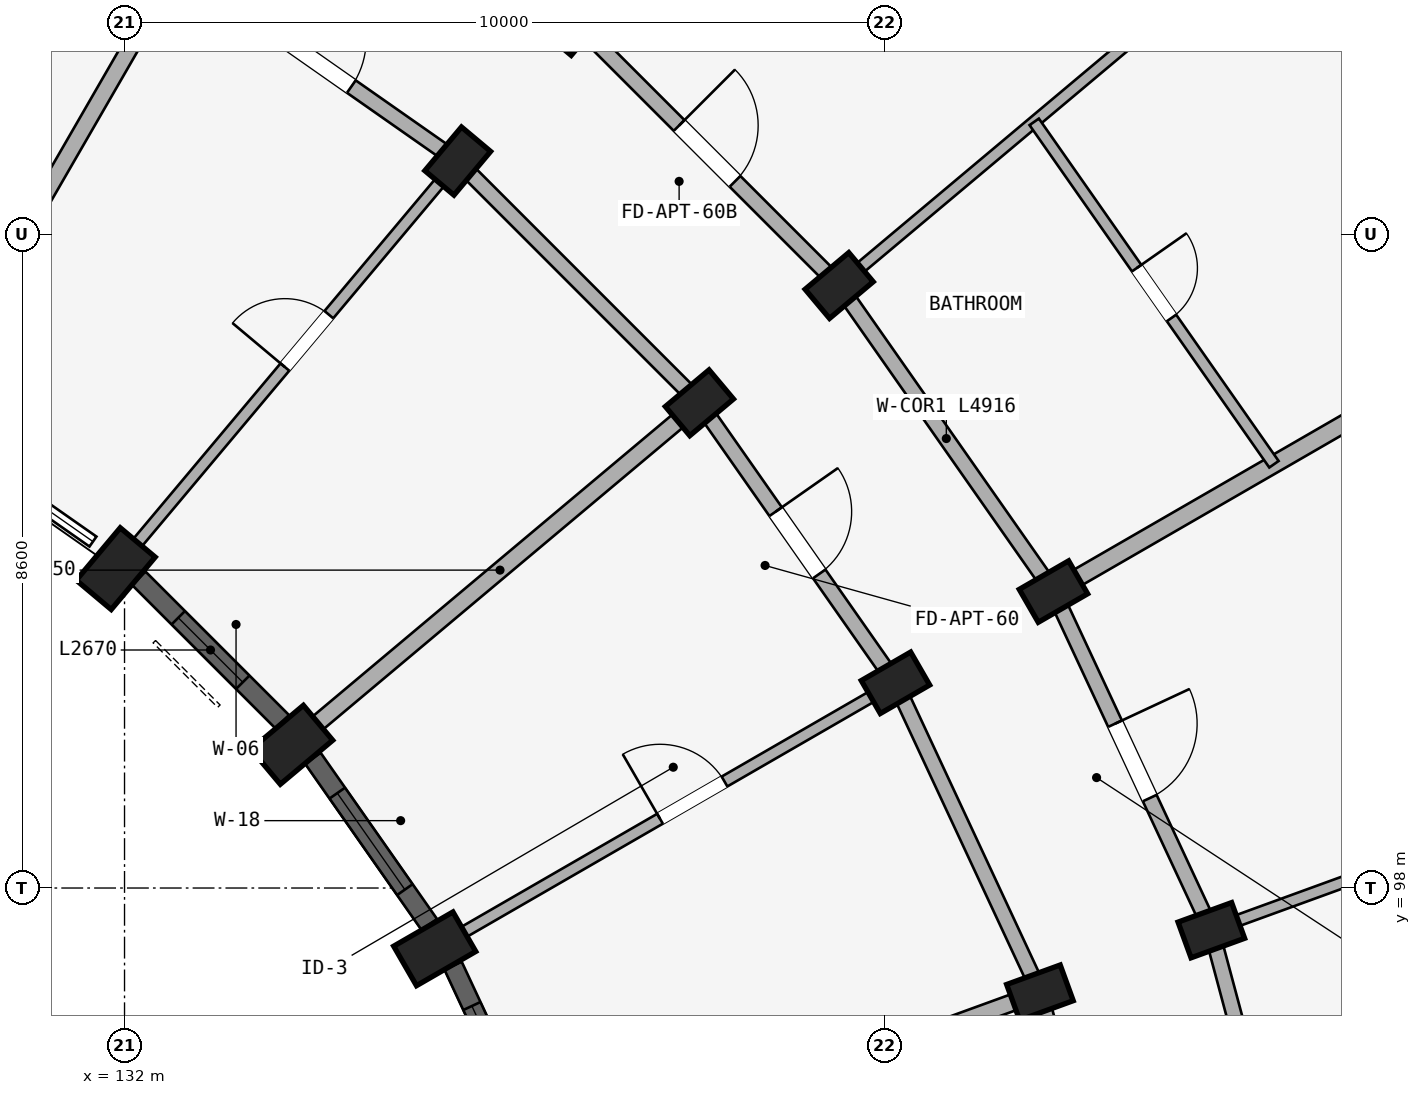
"""IFC4 building model, lengths in metres.
Left out: names, types, materials, properties, quantities, classifications, styles, units other than length and angle.
Written with IfcOpenShell. Run it as: python <this file> out.ifc"""

import sys

from ifc_helpers import new_model, si_unit, direction, frame, frame_2d, origin, origin_2d, place, context, subcontext, project, spatial, rectangle, extrude, element, fill, save


model = new_model("IFC4")
c1 = context("Model", 3, precision=1e-05, world=origin(), true_north=direction((0.0, 1.0)))
c2 = subcontext(c1, "Body", "Model", "MODEL_VIEW")
j1 = project(units=[si_unit("LENGTHUNIT", "METRE"), si_unit("PLANEANGLEUNIT", "RADIAN")], contexts=[c1])
p1 = place(None, origin())
s1 = spatial("IfcSite", under=j1, at=p1, CompositionType="ELEMENT")
p2 = place(p1, origin())
s2 = spatial("IfcBuilding", under=s1, at=p2, CompositionType="ELEMENT")
p3 = place(p2, frame((0.0, 0.0, 4.5)))
s3 = spatial("IfcBuildingStorey", under=s2, at=p3, CompositionType="ELEMENT", Elevation=4.5)
p4 = place(p3, frame((131.885, 102.202, 0.0), z_axis=(0.0, 0.0, 1.0), x_axis=(-0.766044443119, 0.642787609687, 0.0)))
e1 = element("IfcColumn", 1, at=p4, inside=s3, PredefinedType="COLUMN", context=c2, shape_type="SweptSolid", body=[
    extrude(rectangle(XDim=0.6, YDim=0.9, at=origin_2d()), origin(), (0.0, 0.0, 1.0), 3.98),
])
for number, where, z_axis, x_axis in (
    (2, (136.384, 107.564, 0.0), (0.0, 0.0, 1.0), (-0.766, 0.643, 0.0)),
    (3, (137.927, 109.402, 0.0), (0.0, 0.0, 1.0), (-0.766, 0.643, 0.0)),
):
    element("IfcColumn", number, at=place(p3, frame(where, z_axis=z_axis, x_axis=x_axis)), inside=s3, PredefinedType="COLUMN", context=c2, shape_type="SweptSolid", body=[
        extrude(rectangle(XDim=0.5, YDim=0.75, at=origin_2d()), origin(), (0.0, 0.0, 1.0), 3.98),
    ])
p5 = place(p3, frame((134.202, 99.885, 0.0), z_axis=(0.0, 0.0, 1.0), x_axis=(-0.642787609687, 0.766044443119, 0.0)))
e4 = element("IfcColumn", 4, at=p5, inside=s3, PredefinedType="COLUMN", context=c2, shape_type="SweptSolid", body=[
    extrude(rectangle(XDim=0.6, YDim=0.9, at=origin_2d()), origin(), (0.0, 0.0, 1.0), 3.98),
])
for number, where, z_axis, x_axis in (
    (5, (139.564, 104.384, 0.0), (0.0, 0.0, 1.0), (-0.643, 0.766, 0.0)),
    (6, (141.402, 105.927, 0.0), (0.0, 0.0, 1.0), (-0.643, 0.766, 0.0)),
):
    element("IfcColumn", number, at=place(p3, frame(where, z_axis=z_axis, x_axis=x_axis)), inside=s3, PredefinedType="COLUMN", context=c2, shape_type="SweptSolid", body=[
        extrude(rectangle(XDim=0.5, YDim=0.75, at=origin_2d()), origin(), (0.0, 0.0, 1.0), 3.98),
    ])
p6 = place(p3, frame((136.081, 97.2, 0.0), z_axis=(0.0, 0.0, 1.0), x_axis=(-0.5, 0.866025403784, 0.0)))
e7 = element("IfcColumn", 7, at=p6, inside=s3, PredefinedType="COLUMN", context=c2, shape_type="SweptSolid", body=[
    extrude(rectangle(XDim=0.6, YDim=0.9, at=origin_2d()), origin(), (0.0, 0.0, 1.0), 3.98),
])
for number, where, z_axis, x_axis in (
    (8, (142.144, 100.7, 0.0), (0.0, 0.0, 1.0), (-0.5, 0.866, 0.0)),
    (9, (144.222, 101.9, 0.0), (0.0, 0.0, 1.0), (-0.5, 0.866, 0.0)),
    (10, (144.044, 96.624, 0.0), (0.0, 0.0, 1.0), (-0.342, 0.94, 0.0)),
    (11, (146.299, 97.445, 0.0), (0.0, 0.0, 1.0), (-0.342, 0.94, 0.0)),
):
    element("IfcColumn", number, at=place(p3, frame(where, z_axis=z_axis, x_axis=x_axis)), inside=s3, PredefinedType="COLUMN", context=c2, shape_type="SweptSolid", body=[
        extrude(rectangle(XDim=0.5, YDim=0.75, at=origin_2d()), origin(), (0.0, 0.0, 1.0), 3.98),
    ])
p7 = place(p3, frame((132.7, 110.144, 0.0), z_axis=(0.0, 0.0, 1.0), x_axis=(0.819155404658, -0.573571637217, 0.0)))
e12 = element("IfcWall", 12, at=p7, inside=s3, PredefinedType="STANDARD", context=c2, shape_type="SweptSolid", body=[
    extrude(rectangle(XDim=4.497, YDim=0.2, at=frame_2d((2.249, 0.0))), origin(), (0.0, 0.0, 1.0), 3.322),
])
p8 = place(p7, frame((1.709, 0.0, 0.0)))
e13 = element("IfcOpeningElement", 13, at=p8, cuts=e12, PredefinedType="OPENING", context=c2, shape_type="SweptSolid", body=[
    extrude(rectangle(XDim=1.08, YDim=2.15, at=frame_2d((0.54, 1.075))), frame((0.0, 0.11, 0.0), z_axis=(0.0, -1.0, 0.0), x_axis=(1.0, 0.0, 0.0)), (0.0, 0.0, 1.0), 0.22),
])
p9 = place(p3, frame((136.384, 107.564, 0.0), z_axis=(0.0, 0.0, 1.0), x_axis=(0.707106781187, -0.707106781187, 0.0)))
e14 = element("IfcWall", 14, at=p9, inside=s3, PredefinedType="STANDARD", context=c2, shape_type="SweptSolid", body=[
    extrude(rectangle(XDim=4.497, YDim=0.2, at=frame_2d((2.249, 0.0))), origin(), (0.0, 0.0, 1.0), 3.322),
])
p10 = place(p3, frame((137.927, 109.402, 0.0), z_axis=(0.0, 0.0, 1.0), x_axis=(0.707106781187, -0.707106781187, 0.0)))
e15 = element("IfcWall", 15, at=p10, inside=s3, PredefinedType="STANDARD", context=c2, shape_type="SweptSolid", body=[
    extrude(rectangle(XDim=4.916, YDim=0.2, at=frame_2d((2.458, 0.0))), origin(), (0.0, 0.0, 1.0), 3.322),
])
p11 = place(p10, frame((1.938, 0.0, 0.0)))
e16 = element("IfcOpeningElement", 16, at=p11, cuts=e15, PredefinedType="OPENING", context=c2, shape_type="SweptSolid", body=[
    extrude(rectangle(XDim=1.04, YDim=2.15, at=frame_2d((0.52, 1.075))), frame((0.0, 0.11, 0.0), z_axis=(0.0, -1.0, 0.0), x_axis=(1.0, 0.0, 0.0)), (0.0, 0.0, 1.0), 0.22),
])
p12 = place(p3, frame((139.564, 104.384, 0.0), z_axis=(0.0, 0.0, 1.0), x_axis=(0.573571637217, -0.819155404658, 0.0)))
e17 = element("IfcWall", 17, at=p12, inside=s3, PredefinedType="STANDARD", context=c2, shape_type="SweptSolid", body=[
    extrude(rectangle(XDim=4.497, YDim=0.2, at=frame_2d((2.249, 0.0))), origin(), (0.0, 0.0, 1.0), 3.322),
])
p13 = place(p12, frame((1.749, 0.0, 0.0)))
e18 = element("IfcOpeningElement", 18, at=p13, cuts=e17, PredefinedType="OPENING", context=c2, shape_type="SweptSolid", body=[
    extrude(rectangle(XDim=1.0, YDim=2.15, at=frame_2d((0.5, 1.075))), frame((0.0, 0.11, 0.0), z_axis=(0.0, -1.0, 0.0), x_axis=(1.0, 0.0, 0.0)), (0.0, 0.0, 1.0), 0.22),
])
p14 = place(p3, frame((141.402, 105.927, 0.0), z_axis=(0.0, 0.0, 1.0), x_axis=(0.573592335331, -0.819140911474, 0.0)))
e19 = element("IfcWall", 19, at=p14, inside=s3, PredefinedType="STANDARD", context=c2, shape_type="SweptSolid", body=[
    extrude(rectangle(XDim=4.916, YDim=0.2, at=frame_2d((2.458, 0.0))), origin(), (0.0, 0.0, 1.0), 3.322),
])
p15 = place(p3, frame((142.144, 100.7, 0.0), z_axis=(0.0, 0.0, 1.0), x_axis=(0.422617978463, -0.906307919131, 0.0)))
e20 = element("IfcWall", 20, at=p15, inside=s3, PredefinedType="STANDARD", context=c2, shape_type="SweptSolid", body=[
    extrude(rectangle(XDim=4.497, YDim=0.2, at=frame_2d((2.249, 0.0))), origin(), (0.0, 0.0, 1.0), 3.322),
])
p16 = place(p3, frame((144.222, 101.9, 0.0), z_axis=(0.0, 0.0, 1.0), x_axis=(0.422629854778, -0.906302381024, 0.0)))
e21 = element("IfcWall", 21, at=p16, inside=s3, PredefinedType="STANDARD", context=c2, shape_type="SweptSolid", body=[
    extrude(rectangle(XDim=4.915, YDim=0.2, at=frame_2d((2.458, 0.0))), origin(), (0.0, 0.0, 1.0), 3.322),
])
p17 = place(p16, frame((1.918, 0.0, 0.0)))
e22 = element("IfcOpeningElement", 22, at=p17, cuts=e21, PredefinedType="OPENING", context=c2, shape_type="SweptSolid", body=[
    extrude(rectangle(XDim=1.08, YDim=2.15, at=frame_2d((0.54, 1.075))), frame((0.0, 0.11, 0.0), z_axis=(0.0, -1.0, 0.0), x_axis=(1.0, 0.0, 0.0)), (0.0, 0.0, 1.0), 0.22),
])
p18 = place(p3, frame((144.044, 96.624, 0.0), z_axis=(0.0, 0.0, 1.0), x_axis=(0.258787642463, -0.965934240054, 0.0)))
e23 = element("IfcWall", 23, at=p18, inside=s3, PredefinedType="STANDARD", context=c2, shape_type="SweptSolid", body=[
    extrude(rectangle(XDim=4.497, YDim=0.2, at=frame_2d((2.249, 0.0))), origin(), (0.0, 0.0, 1.0), 3.322),
])
p19 = place(p18, frame((1.729, 0.0, 0.0)))
e24 = element("IfcOpeningElement", 24, at=p19, cuts=e23, PredefinedType="OPENING", context=c2, shape_type="SweptSolid", body=[
    extrude(rectangle(XDim=1.04, YDim=2.15, at=frame_2d((0.52, 1.075))), frame((0.0, 0.11, 0.0), z_axis=(0.0, -1.0, 0.0), x_axis=(1.0, 0.0, 0.0)), (0.0, 0.0, 1.0), 0.22),
])
p20 = place(p3, frame((146.299, 97.445, 0.0), z_axis=(0.0, 0.0, 1.0), x_axis=(0.258803112091, -0.965930095386, 0.0)))
e25 = element("IfcWall", 25, at=p20, inside=s3, PredefinedType="STANDARD", context=c2, shape_type="SweptSolid", body=[
    extrude(rectangle(XDim=4.916, YDim=0.2, at=frame_2d((2.458, 0.0))), origin(), (0.0, 0.0, 1.0), 3.322),
])
p21 = place(p3, frame((129.3, 104.254, 0.0), z_axis=(0.0, 0.0, 1.0), x_axis=(0.499997969693, 0.866026575979, 0.0)))
e26 = element("IfcWall", 26, at=p21, inside=s3, PredefinedType="STANDARD", context=c2, shape_type="SweptSolid", body=[
    extrude(rectangle(XDim=6.75, YDim=0.22, at=frame_2d((3.375, 0.0))), origin(), (0.0, 0.0, 1.0), 3.322),
])
p22 = place(p3, frame((132.013, 102.355, 0.0), z_axis=(0.0, 0.0, 1.0), x_axis=(0.642784846501, 0.766046761698, 0.0)))
e27 = element("IfcWall", 27, at=p22, inside=s3, PredefinedType="PARTITIONING", context=c2, shape_type="SweptSolid", body=[
    extrude(rectangle(XDim=6.75, YDim=0.15, at=frame_2d((3.375, 0.0))), origin(), (0.0, 0.0, 1.0), 3.322),
])
p23 = place(p22, frame((3.262, 0.0, 0.0)))
e28 = element("IfcOpeningElement", 28, at=p23, cuts=e27, PredefinedType="OPENING", context=c2, shape_type="SweptSolid", body=[
    extrude(rectangle(XDim=0.9, YDim=2.1, at=frame_2d((0.45, 1.05))), frame((0.0, 0.085, 0.0), z_axis=(0.0, -1.0, 0.0), x_axis=(1.0, 0.0, 0.0)), (0.0, 0.0, 1.0), 0.17),
])
p24 = place(p3, frame((134.355, 100.013, 0.0), z_axis=(0.0, 0.0, 1.0), x_axis=(0.766046761698, 0.642784846501, 0.0)))
e29 = element("IfcWall", 29, at=p24, inside=s3, PredefinedType="STANDARD", context=c2, shape_type="SweptSolid", body=[
    extrude(rectangle(XDim=6.75, YDim=0.22, at=frame_2d((3.375, 0.0))), origin(), (0.0, 0.0, 1.0), 3.322),
])
p25 = place(p3, frame((141.479, 105.991, 0.0), z_axis=(0.0, 0.0, 1.0), x_axis=(0.766046835987, 0.642784757967, 0.0)))
e30 = element("IfcWall", 30, at=p25, inside=s3, PredefinedType="PARTITIONING", context=c2, shape_type="SweptSolid", body=[
    extrude(rectangle(XDim=17.42, YDim=0.15, at=frame_2d((8.71, 0.0))), origin(), (0.0, 0.0, 1.0), 3.322),
])
p26 = place(p25, frame((7.5, 0.0, 0.0)))
e31 = element("IfcOpeningElement", 31, at=p26, cuts=e30, PredefinedType="OPENING", context=c2, shape_type="SweptSolid", body=[
    extrude(rectangle(XDim=0.8, YDim=2.1, at=frame_2d((0.4, 1.05))), frame((0.0, 0.085, 0.0), z_axis=(0.0, -1.0, 0.0), x_axis=(1.0, 0.0, 0.0)), (0.0, 0.0, 1.0), 0.17),
])
p27 = place(p3, frame((136.254, 97.3, 0.0), z_axis=(0.0, 0.0, 1.0), x_axis=(0.866026575979, 0.499997969693, 0.0)))
e32 = element("IfcWall", 32, at=p27, inside=s3, PredefinedType="PARTITIONING", context=c2, shape_type="SweptSolid", body=[
    extrude(rectangle(XDim=6.75, YDim=0.15, at=frame_2d((3.375, 0.0))), origin(), (0.0, 0.0, 1.0), 3.322),
])
p28 = place(p27, frame((3.222, 0.0, 0.0)))
e33 = element("IfcOpeningElement", 33, at=p28, cuts=e32, PredefinedType="OPENING", context=c2, shape_type="SweptSolid", body=[
    extrude(rectangle(XDim=0.98, YDim=2.12, at=frame_2d((0.49, 1.06))), frame((0.0, 0.085, 0.0), z_axis=(0.0, -1.0, 0.0), x_axis=(1.0, 0.0, 0.0)), (0.0, 0.0, 1.0), 0.17),
])
p29 = place(p3, frame((144.309, 101.95, 0.0), z_axis=(0.0, 0.0, 1.0), x_axis=(0.866026648973, 0.499997843263, 0.0)))
e34 = element("IfcWall", 34, at=p29, inside=s3, PredefinedType="STANDARD", context=c2, shape_type="SweptSolid", body=[
    extrude(rectangle(XDim=17.42, YDim=0.23, at=frame_2d((8.71, 0.0))), origin(), (0.0, 0.0, 1.0), 3.322),
])
p30 = place(p3, frame((137.654, 94.298, 0.0), z_axis=(0.0, 0.0, 1.0), x_axis=(0.939696231917, 0.342010221662, 0.0)))
e35 = element("IfcWall", 35, at=p30, inside=s3, PredefinedType="STANDARD", context=c2, shape_type="SweptSolid", body=[
    extrude(rectangle(XDim=6.75, YDim=0.22, at=frame_2d((3.375, 0.0))), origin(), (0.0, 0.0, 1.0), 3.322),
])
p31 = place(p3, frame((146.393, 97.479, 0.0), z_axis=(0.0, 0.0, 1.0), x_axis=(0.939691901159, 0.342022120477, 0.0)))
e36 = element("IfcWall", 36, at=p31, inside=s3, PredefinedType="PARTITIONING", context=c2, shape_type="SweptSolid", body=[
    extrude(rectangle(XDim=17.42, YDim=0.15, at=frame_2d((8.71, 0.0))), origin(), (0.0, 0.0, 1.0), 3.322),
])
p32 = place(p31, frame((7.5, 0.0, 0.0)))
e37 = element("IfcOpeningElement", 37, at=p32, cuts=e36, PredefinedType="OPENING", context=c2, shape_type="SweptSolid", body=[
    extrude(rectangle(XDim=0.8, YDim=2.1, at=frame_2d((0.4, 1.05))), frame((0.0, 0.085, 0.0), z_axis=(0.0, -1.0, 0.0), x_axis=(1.0, 0.0, 0.0)), (0.0, 0.0, 1.0), 0.17),
])
p33 = place(p3, frame((143.969, 108.08, 0.0), z_axis=(0.0, 0.0, 1.0), x_axis=(0.573569599955, -0.819156831143, 0.0)))
e38 = element("IfcWall", 38, at=p33, inside=s3, PredefinedType="PLUMBINGWALL", context=c2, shape_type="SweptSolid", body=[
    extrude(rectangle(XDim=5.5, YDim=0.15, at=frame_2d((2.75, 0.0))), origin(), (0.0, 0.0, 1.0), 3.322),
])
p34 = place(p33, frame((2.35, 0.0, 0.0)))
e39 = element("IfcOpeningElement", 39, at=p34, cuts=e38, PredefinedType="OPENING", context=c2, shape_type="SweptSolid", body=[
    extrude(rectangle(XDim=0.8, YDim=2.1, at=frame_2d((0.4, 1.05))), frame((0.0, 0.085, 0.0), z_axis=(0.0, -1.0, 0.0), x_axis=(1.0, 0.0, 0.0)), (0.0, 0.0, 1.0), 0.17),
])
p35 = place(p3, frame((132.188, 102.075, 0.0), z_axis=(0.0, 0.0, 1.0), x_axis=(0.707106781187, -0.707106781187, 0.0)))
e40 = element("IfcWall", 40, at=p35, inside=s3, PredefinedType="STANDARD", context=c2, shape_type="SweptSolid", body=[
    extrude(rectangle(XDim=2.67, YDim=0.25, at=frame_2d((1.335, 0.0))), origin(), (0.0, 0.0, 1.0), 3.472),
])
p36 = place(p35, frame((0.735, 0.0, 0.88)))
e41 = element("IfcOpeningElement", 41, at=p36, cuts=e40, PredefinedType="OPENING", context=c2, shape_type="SweptSolid", body=[
    extrude(rectangle(XDim=1.2, YDim=1.5, at=frame_2d((0.6, 0.75))), frame((0.0, 0.135, 0.0), z_axis=(0.0, -1.0, 0.0), x_axis=(1.0, 0.0, 0.0)), (0.0, 0.0, 1.0), 0.27),
])
p37 = place(p3, frame((134.478, 99.707, 0.0), z_axis=(0.0, 0.0, 1.0), x_axis=(0.573591230309, -0.819141685249, 0.0)))
e42 = element("IfcWall", 42, at=p37, inside=s3, PredefinedType="STANDARD", context=c2, shape_type="SweptSolid", body=[
    extrude(rectangle(XDim=2.67, YDim=0.25, at=frame_2d((1.335, 0.0))), origin(), (0.0, 0.0, 1.0), 3.472),
])
p38 = place(p37, frame((0.56, 0.0, 0.88)))
e43 = element("IfcOpeningElement", 43, at=p38, cuts=e42, PredefinedType="OPENING", context=c2, shape_type="SweptSolid", body=[
    extrude(rectangle(XDim=1.55, YDim=1.6, at=frame_2d((0.775, 0.8))), frame((0.0, 0.135, 0.0), z_axis=(0.0, -1.0, 0.0), x_axis=(1.0, 0.0, 0.0)), (0.0, 0.0, 1.0), 0.27),
])
p39 = place(p3, frame((136.323, 96.978, 0.0), z_axis=(0.0, 0.0, 1.0), x_axis=(0.422610081738, -0.90631160139, 0.0)))
e44 = element("IfcWall", 44, at=p39, inside=s3, PredefinedType="STANDARD", context=c2, shape_type="SweptSolid", body=[
    extrude(rectangle(XDim=2.669, YDim=0.25, at=frame_2d((1.335, 0.0))), origin(), (0.0, 0.0, 1.0), 3.472),
])
p40 = place(p39, frame((0.585, 0.0, 0.88)))
e45 = element("IfcOpeningElement", 45, at=p40, cuts=e44, PredefinedType="OPENING", context=c2, shape_type="SweptSolid", body=[
    extrude(rectangle(XDim=1.5, YDim=1.65, at=frame_2d((0.75, 0.825))), frame((0.0, 0.135, 0.0), z_axis=(0.0, -1.0, 0.0), x_axis=(1.0, 0.0, 0.0)), (0.0, 0.0, 1.0), 0.27),
])
p41 = place(p36, origin())
e46 = element("IfcWindow", 46, at=p41, inside=s3, PartitioningType="SINGLE_PANEL", PredefinedType="WINDOW", context=c2, shape_type="SweptSolid", body=[
    extrude(rectangle(XDim=1.2, YDim=1.5, at=frame_2d((0.6, 0.75))), frame((0.0, 0.03, 0.0), z_axis=(0.0, -1.0, 0.0), x_axis=(1.0, 0.0, 0.0)), (0.0, 0.0, 1.0), 0.06),
])
fill(e41, e46)
p42 = place(p38, origin())
e47 = element("IfcWindow", 47, at=p42, inside=s3, PartitioningType="DOUBLE_PANEL_VERTICAL", PredefinedType="WINDOW", context=c2, shape_type="SweptSolid", body=[
    extrude(rectangle(XDim=1.55, YDim=1.6, at=frame_2d((0.775, 0.8))), frame((0.0, 0.03, 0.0), z_axis=(0.0, -1.0, 0.0), x_axis=(1.0, 0.0, 0.0)), (0.0, 0.0, 1.0), 0.06),
])
fill(e43, e47)
p43 = place(p40, origin())
e48 = element("IfcWindow", 48, at=p43, inside=s3, PartitioningType="DOUBLE_PANEL_VERTICAL", PredefinedType="WINDOW", context=c2, shape_type="SweptSolid", body=[
    extrude(rectangle(XDim=1.5, YDim=1.65, at=frame_2d((0.75, 0.825))), frame((0.0, 0.03, 0.0), z_axis=(0.0, -1.0, 0.0), x_axis=(1.0, 0.0, 0.0)), (0.0, 0.0, 1.0), 0.06),
])
fill(e45, e48)
p44 = place(p23, frame((0.9, 0.0, 0.0), z_axis=(0.0, 0.0, 1.0), x_axis=(-1.0, 0.0, 0.0)))
e49 = element("IfcDoor", 49, at=p44, inside=s3, OperationType="SINGLE_SWING_RIGHT", PredefinedType="DOOR", context=c2, shape_type="SweptSolid", body=[
    extrude(rectangle(XDim=0.9, YDim=2.1, at=frame_2d((0.45, 1.05))), frame((0.0, 0.025, 0.0), z_axis=(0.0, -1.0, 0.0), x_axis=(1.0, 0.0, 0.0)), (0.0, 0.0, 1.0), 0.05),
])
fill(e28, e49)
p45 = place(p28, frame((0.98, 0.0, 0.0), z_axis=(0.0, 0.0, 1.0), x_axis=(-1.0, 0.0, 0.0)))
e50 = element("IfcDoor", 50, at=p45, inside=s3, OperationType="SINGLE_SWING_RIGHT", PredefinedType="DOOR", context=c2, shape_type="SweptSolid", body=[
    extrude(rectangle(XDim=0.98, YDim=2.12, at=frame_2d((0.49, 1.06))), frame((0.0, 0.025, 0.0), z_axis=(0.0, -1.0, 0.0), x_axis=(1.0, 0.0, 0.0)), (0.0, 0.0, 1.0), 0.05),
])
fill(e33, e50)
p46 = place(p11, origin())
e51 = element("IfcDoor", 51, at=p46, inside=s3, OperationType="SINGLE_SWING_LEFT", PredefinedType="DOOR", context=c2, shape_type="SweptSolid", body=[
    extrude(rectangle(XDim=1.04, YDim=2.15, at=frame_2d((0.52, 1.075))), frame((0.0, 0.025, 0.0), z_axis=(0.0, -1.0, 0.0), x_axis=(1.0, 0.0, 0.0)), (0.0, 0.0, 1.0), 0.05),
])
fill(e16, e51)
p47 = place(p34, frame((0.8, 0.0, 0.0), z_axis=(0.0, 0.0, 1.0), x_axis=(-1.0, 0.0, 0.0)))
e52 = element("IfcDoor", 52, at=p47, inside=s3, OperationType="SINGLE_SWING_RIGHT", PredefinedType="DOOR", context=c2, shape_type="SweptSolid", body=[
    extrude(rectangle(XDim=0.8, YDim=2.1, at=frame_2d((0.4, 1.05))), frame((0.0, 0.025, 0.0), z_axis=(0.0, -1.0, 0.0), x_axis=(1.0, 0.0, 0.0)), (0.0, 0.0, 1.0), 0.05),
])
fill(e39, e52)
p48 = place(p17, origin())
e53 = element("IfcDoor", 53, at=p48, inside=s3, OperationType="SINGLE_SWING_LEFT", PredefinedType="DOOR", context=c2, shape_type="SweptSolid", body=[
    extrude(rectangle(XDim=1.08, YDim=2.15, at=frame_2d((0.54, 1.075))), frame((0.0, 0.025, 0.0), z_axis=(0.0, -1.0, 0.0), x_axis=(1.0, 0.0, 0.0)), (0.0, 0.0, 1.0), 0.05),
])
fill(e22, e53)
p49 = place(p8, frame((1.08, 0.0, 0.0), z_axis=(0.0, 0.0, 1.0), x_axis=(-1.0, 0.0, 0.0)))
e54 = element("IfcDoor", 54, at=p49, inside=s3, OperationType="SINGLE_SWING_RIGHT", PredefinedType="DOOR", context=c2, shape_type="SweptSolid", body=[
    extrude(rectangle(XDim=1.08, YDim=2.15, at=frame_2d((0.54, 1.075))), frame((0.0, 0.025, 0.0), z_axis=(0.0, -1.0, 0.0), x_axis=(1.0, 0.0, 0.0)), (0.0, 0.0, 1.0), 0.05),
])
fill(e13, e54)
p50 = place(p13, origin())
e55 = element("IfcDoor", 55, at=p50, inside=s3, OperationType="SINGLE_SWING_LEFT", PredefinedType="DOOR", context=c2, shape_type="SweptSolid", body=[
    extrude(rectangle(XDim=1.0, YDim=2.15, at=frame_2d((0.5, 1.075))), frame((0.0, 0.025, 0.0), z_axis=(0.0, -1.0, 0.0), x_axis=(1.0, 0.0, 0.0)), (0.0, 0.0, 1.0), 0.05),
])
fill(e18, e55)
save(model, sys.argv[1])
